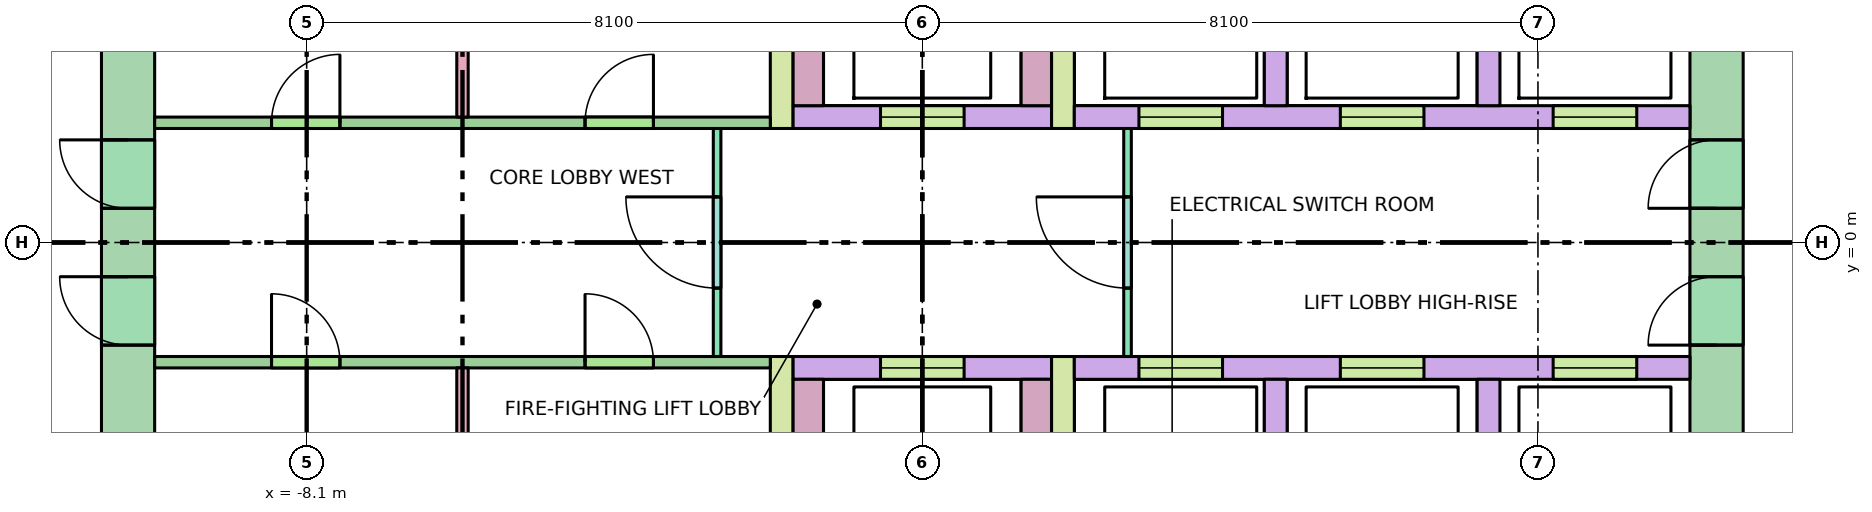
"""IFC4 building model, lengths in metres.
Left out: names, types, materials, properties, quantities, classifications, styles, units other than length and angle.
Written with IfcOpenShell. Run it as: python <this file> out.ifc"""

import sys

from ifc_helpers import new_model, si_unit, direction, frame, frame_2d, origin, place, context, subcontext, project, spatial, rectangle, extrude, element, fill, save


model = new_model("IFC4")
c1 = context("Model", 3, precision=1e-05, world=origin(), true_north=direction((0.0, 1.0)))
c2 = subcontext(c1, "Body", "Model", "MODEL_VIEW")
j1 = project(units=[si_unit("LENGTHUNIT", "METRE"), si_unit("PLANEANGLEUNIT", "RADIAN")], contexts=[c1])
p1 = place(None, origin())
s1 = spatial("IfcSite", under=j1, at=p1, CompositionType="ELEMENT")
p2 = place(p1, origin())
s2 = spatial("IfcBuilding", under=s1, at=p2, CompositionType="ELEMENT")
p3 = place(p2, frame((0.0, 0.0, 183.8)))
s3 = spatial("IfcBuildingStorey", under=s2, at=p3, CompositionType="ELEMENT", Elevation=183.8)
p4 = place(p3, frame((-10.45, -5.13, -0.28), z_axis=(0.0, 0.0, 1.0), x_axis=(0.0, 1.0, 0.0)))
e1 = element("IfcWall", 1, at=p4, inside=s3, PredefinedType="SHEAR", context=c2, shape_type="SweptSolid", body=[
    extrude(rectangle(XDim=10.26, YDim=0.7, at=frame_2d((5.13, 0.0))), origin(), (0.0, 0.0, 1.0), 9.0),
])
p5 = place(p4, frame((5.58, 0.0, 0.28)))
e2 = element("IfcOpeningElement", 2, at=p5, cuts=e1, PredefinedType="OPENING", context=c2, shape_type="SweptSolid", body=[
    extrude(rectangle(XDim=0.9, YDim=2.1, at=frame_2d((0.45, 1.05))), frame((0.0, 0.36, 0.0), z_axis=(0.0, -1.0, 0.0), x_axis=(1.0, 0.0, 0.0)), (0.0, 0.0, 1.0), 0.72),
])
p6 = place(p4, frame((3.78, 0.0, 0.28)))
e3 = element("IfcOpeningElement", 3, at=p6, cuts=e1, PredefinedType="OPENING", context=c2, shape_type="SweptSolid", body=[
    extrude(rectangle(XDim=0.9, YDim=2.1, at=frame_2d((0.45, 1.05))), frame((0.0, 0.36, 0.0), z_axis=(0.0, -1.0, 0.0), x_axis=(1.0, 0.0, 0.0)), (0.0, 0.0, 1.0), 0.72),
])
p7 = place(p3, frame((10.45, -5.13, -0.28), z_axis=(0.0, 0.0, 1.0), x_axis=(0.0, 1.0, 0.0)))
e4 = element("IfcWall", 4, at=p7, inside=s3, PredefinedType="SHEAR", context=c2, shape_type="SweptSolid", body=[
    extrude(rectangle(XDim=10.26, YDim=0.7, at=frame_2d((5.13, 0.0))), origin(), (0.0, 0.0, 1.0), 9.0),
])
p8 = place(p7, frame((5.58, 0.0, 0.28)))
e5 = element("IfcOpeningElement", 5, at=p8, cuts=e4, PredefinedType="OPENING", context=c2, shape_type="SweptSolid", body=[
    extrude(rectangle(XDim=0.9, YDim=2.1, at=frame_2d((0.45, 1.05))), frame((0.0, 0.36, 0.0), z_axis=(0.0, -1.0, 0.0), x_axis=(1.0, 0.0, 0.0)), (0.0, 0.0, 1.0), 0.72),
])
p9 = place(p7, frame((3.78, 0.0, 0.28)))
e6 = element("IfcOpeningElement", 6, at=p9, cuts=e4, PredefinedType="OPENING", context=c2, shape_type="SweptSolid", body=[
    extrude(rectangle(XDim=0.9, YDim=2.1, at=frame_2d((0.45, 1.05))), frame((0.0, 0.36, 0.0), z_axis=(0.0, -1.0, 0.0), x_axis=(1.0, 0.0, 0.0)), (0.0, 0.0, 1.0), 0.72),
])
p10 = place(p3, frame((2.0, 1.65, 0.0), z_axis=(0.0, 0.0, 1.0), x_axis=(1.0, 0.0, 0.0)))
e7 = element("IfcWall", 7, at=p10, inside=s3, PredefinedType="SOLIDWALL", context=c2, shape_type="SweptSolid", body=[
    extrude(rectangle(XDim=8.1, YDim=0.3, at=frame_2d((4.05, 0.0))), origin(), (0.0, 0.0, 1.0), 8.72),
])
p11 = place(p10, frame((0.85, 0.0, 0.0)))
e8 = element("IfcOpeningElement", 8, at=p11, cuts=e7, PredefinedType="OPENING", context=c2, shape_type="SweptSolid", body=[
    extrude(rectangle(XDim=1.1, YDim=2.1, at=frame_2d((0.55, 1.05))), frame((0.0, 0.16, 0.0), z_axis=(0.0, -1.0, 0.0), x_axis=(1.0, 0.0, 0.0)), (0.0, 0.0, 1.0), 0.32),
])
p12 = place(p10, frame((3.5, 0.0, 0.0)))
e9 = element("IfcOpeningElement", 9, at=p12, cuts=e7, PredefinedType="OPENING", context=c2, shape_type="SweptSolid", body=[
    extrude(rectangle(XDim=1.1, YDim=2.1, at=frame_2d((0.55, 1.05))), frame((0.0, 0.16, 0.0), z_axis=(0.0, -1.0, 0.0), x_axis=(1.0, 0.0, 0.0)), (0.0, 0.0, 1.0), 0.32),
])
p13 = place(p10, frame((6.3, 0.0, 0.0)))
e10 = element("IfcOpeningElement", 10, at=p13, cuts=e7, PredefinedType="OPENING", context=c2, shape_type="SweptSolid", body=[
    extrude(rectangle(XDim=1.1, YDim=2.1, at=frame_2d((0.55, 1.05))), frame((0.0, 0.16, 0.0), z_axis=(0.0, -1.0, 0.0), x_axis=(1.0, 0.0, 0.0)), (0.0, 0.0, 1.0), 0.32),
])
p14 = place(p3, frame((2.0, -1.65, 0.0), z_axis=(0.0, 0.0, 1.0), x_axis=(1.0, 0.0, 0.0)))
e11 = element("IfcWall", 11, at=p14, inside=s3, PredefinedType="SOLIDWALL", context=c2, shape_type="SweptSolid", body=[
    extrude(rectangle(XDim=8.1, YDim=0.3, at=frame_2d((4.05, 0.0))), origin(), (0.0, 0.0, 1.0), 8.72),
])
p15 = place(p14, frame((0.85, 0.0, 0.0)))
e12 = element("IfcOpeningElement", 12, at=p15, cuts=e11, PredefinedType="OPENING", context=c2, shape_type="SweptSolid", body=[
    extrude(rectangle(XDim=1.1, YDim=2.1, at=frame_2d((0.55, 1.05))), frame((0.0, 0.16, 0.0), z_axis=(0.0, -1.0, 0.0), x_axis=(1.0, 0.0, 0.0)), (0.0, 0.0, 1.0), 0.32),
])
p16 = place(p14, frame((3.5, 0.0, 0.0)))
e13 = element("IfcOpeningElement", 13, at=p16, cuts=e11, PredefinedType="OPENING", context=c2, shape_type="SweptSolid", body=[
    extrude(rectangle(XDim=1.1, YDim=2.1, at=frame_2d((0.55, 1.05))), frame((0.0, 0.16, 0.0), z_axis=(0.0, -1.0, 0.0), x_axis=(1.0, 0.0, 0.0)), (0.0, 0.0, 1.0), 0.32),
])
p17 = place(p14, frame((6.3, 0.0, 0.0)))
e14 = element("IfcOpeningElement", 14, at=p17, cuts=e11, PredefinedType="OPENING", context=c2, shape_type="SweptSolid", body=[
    extrude(rectangle(XDim=1.1, YDim=2.1, at=frame_2d((0.55, 1.05))), frame((0.0, 0.16, 0.0), z_axis=(0.0, -1.0, 0.0), x_axis=(1.0, 0.0, 0.0)), (0.0, 0.0, 1.0), 0.32),
])
for number, where, z_axis, x_axis in (
    (15, (4.65, 1.8, 0.0), (0.0, 0.0, 1.0), (0.0, 1.0, 0.0)),
    (16, (4.65, -4.2, 0.0), (0.0, 0.0, 1.0), (0.0, 1.0, 0.0)),
    (17, (7.45, 1.8, 0.0), (0.0, 0.0, 1.0), (0.0, 1.0, 0.0)),
    (18, (7.45, -4.2, 0.0), (0.0, 0.0, 1.0), (0.0, 1.0, 0.0)),
):
    element("IfcWall", number, at=place(p3, frame(where, z_axis=z_axis, x_axis=x_axis)), inside=s3, PredefinedType="SOLIDWALL", context=c2, shape_type="SweptSolid", body=[
        extrude(rectangle(XDim=2.4, YDim=0.3, at=frame_2d((1.2, 0.0))), origin(), (0.0, 0.0, 1.0), 8.72),
    ])
for number, where, z_axis, x_axis in (
    (19, (-1.85, 1.5, 0.0), (0.0, 0.0, 1.0), (0.0, 1.0, 0.0)),
    (20, (-1.85, -8.1, 0.0), (0.0, 0.0, 1.0), (0.0, 1.0, 0.0)),
    (21, (1.85, 1.5, 0.0), (0.0, 0.0, 1.0), (0.0, 1.0, 0.0)),
    (22, (1.85, -8.1, 0.0), (0.0, 0.0, 1.0), (0.0, 1.0, 0.0)),
):
    element("IfcWall", number, at=place(p3, frame(where, z_axis=z_axis, x_axis=x_axis)), inside=s3, PredefinedType="SHEAR", context=c2, shape_type="SweptSolid", body=[
        extrude(rectangle(XDim=6.6, YDim=0.3, at=frame_2d((3.3, 0.0))), origin(), (0.0, 0.0, 1.0), 8.72),
    ])
p18 = place(p3, frame((-1.7, 1.65, 0.0), z_axis=(0.0, 0.0, 1.0), x_axis=(1.0, 0.0, 0.0)))
e23 = element("IfcWall", 23, at=p18, inside=s3, PredefinedType="SOLIDWALL", context=c2, shape_type="SweptSolid", body=[
    extrude(rectangle(XDim=3.4, YDim=0.3, at=frame_2d((1.7, 0.0))), origin(), (0.0, 0.0, 1.0), 8.72),
])
p19 = place(p18, frame((1.15, 0.0, 0.0)))
e24 = element("IfcOpeningElement", 24, at=p19, cuts=e23, PredefinedType="OPENING", context=c2, shape_type="SweptSolid", body=[
    extrude(rectangle(XDim=1.1, YDim=2.1, at=frame_2d((0.55, 1.05))), frame((0.0, 0.16, 0.0), z_axis=(0.0, -1.0, 0.0), x_axis=(1.0, 0.0, 0.0)), (0.0, 0.0, 1.0), 0.32),
])
p20 = place(p3, frame((-1.7, -1.65, 0.0), z_axis=(0.0, 0.0, 1.0), x_axis=(1.0, 0.0, 0.0)))
e25 = element("IfcWall", 25, at=p20, inside=s3, PredefinedType="SOLIDWALL", context=c2, shape_type="SweptSolid", body=[
    extrude(rectangle(XDim=3.4, YDim=0.3, at=frame_2d((1.7, 0.0))), origin(), (0.0, 0.0, 1.0), 8.72),
])
p21 = place(p20, frame((1.15, 0.0, 0.0)))
e26 = element("IfcOpeningElement", 26, at=p21, cuts=e25, PredefinedType="OPENING", context=c2, shape_type="SweptSolid", body=[
    extrude(rectangle(XDim=1.1, YDim=2.1, at=frame_2d((0.55, 1.05))), frame((0.0, 0.16, 0.0), z_axis=(0.0, -1.0, 0.0), x_axis=(1.0, 0.0, 0.0)), (0.0, 0.0, 1.0), 0.32),
])
for number, where, z_axis, x_axis in (
    (27, (-1.5, 1.8, 0.0), (0.0, 0.0, 1.0), (0.0, 1.0, 0.0)),
    (28, (-1.5, -4.8, 0.0), (0.0, 0.0, 1.0), (0.0, 1.0, 0.0)),
    (29, (1.5, 1.8, 0.0), (0.0, 0.0, 1.0), (0.0, 1.0, 0.0)),
    (30, (1.5, -4.8, 0.0), (0.0, 0.0, 1.0), (0.0, 1.0, 0.0)),
):
    element("IfcWall", number, at=place(p3, frame(where, z_axis=z_axis, x_axis=x_axis)), inside=s3, PredefinedType="SOLIDWALL", context=c2, shape_type="SweptSolid", body=[
        extrude(rectangle(XDim=3.0, YDim=0.4, at=frame_2d((1.5, 0.0))), origin(), (0.0, 0.0, 1.0), 8.72),
    ])
p22 = place(p3, frame((-2.7, -1.5, 0.0), z_axis=(0.0, 0.0, 1.0), x_axis=(0.0, 1.0, 0.0)))
e31 = element("IfcWall", 31, at=p22, inside=s3, PredefinedType="PARTITIONING", context=c2, shape_type="SweptSolid", body=[
    extrude(rectangle(XDim=3.0, YDim=0.1, at=frame_2d((1.5, 0.0))), origin(), (0.0, 0.0, 1.0), 8.72),
])
p23 = place(p22, frame((0.9, 0.0, 0.0)))
e32 = element("IfcOpeningElement", 32, at=p23, cuts=e31, PredefinedType="OPENING", context=c2, shape_type="SweptSolid", body=[
    extrude(rectangle(XDim=1.2, YDim=2.1, at=frame_2d((0.6, 1.05))), frame((0.0, 0.06, 0.0), z_axis=(0.0, -1.0, 0.0), x_axis=(1.0, 0.0, 0.0)), (0.0, 0.0, 1.0), 0.12),
])
p24 = place(p3, frame((2.7, -1.5, 0.0), z_axis=(0.0, 0.0, 1.0), x_axis=(0.0, 1.0, 0.0)))
e33 = element("IfcWall", 33, at=p24, inside=s3, PredefinedType="PARTITIONING", context=c2, shape_type="SweptSolid", body=[
    extrude(rectangle(XDim=3.0, YDim=0.1, at=frame_2d((1.5, 0.0))), origin(), (0.0, 0.0, 1.0), 8.72),
])
p25 = place(p24, frame((0.9, 0.0, 0.0)))
e34 = element("IfcOpeningElement", 34, at=p25, cuts=e33, PredefinedType="OPENING", context=c2, shape_type="SweptSolid", body=[
    extrude(rectangle(XDim=1.2, YDim=2.1, at=frame_2d((0.6, 1.05))), frame((0.0, 0.06, 0.0), z_axis=(0.0, -1.0, 0.0), x_axis=(1.0, 0.0, 0.0)), (0.0, 0.0, 1.0), 0.12),
])
for number, where, z_axis, x_axis in (
    (35, (-6.05, 1.65, 0.0), (0.0, 0.0, 1.0), (0.0, 1.0, 0.0)),
    (36, (-6.05, -4.2, 0.0), (0.0, 0.0, 1.0), (0.0, 1.0, 0.0)),
):
    element("IfcWall", number, at=place(p3, frame(where, z_axis=z_axis, x_axis=x_axis)), inside=s3, PredefinedType="PARTITIONING", context=c2, shape_type="SweptSolid", body=[
        extrude(rectangle(XDim=2.55, YDim=0.15, at=frame_2d((1.275, 0.0))), origin(), (0.0, 0.0, 1.0), 8.72),
    ])
p26 = place(p3, frame((-10.1, 1.575, 0.0), z_axis=(0.0, 0.0, 1.0), x_axis=(1.0, 0.0, 0.0)))
e37 = element("IfcWall", 37, at=p26, inside=s3, PredefinedType="PARTITIONING", context=c2, shape_type="SweptSolid", body=[
    extrude(rectangle(XDim=8.1, YDim=0.15, at=frame_2d((4.05, 0.0))), origin(), (0.0, 0.0, 1.0), 8.72),
])
p27 = place(p26, frame((1.538, 0.0, 0.0)))
e38 = element("IfcOpeningElement", 38, at=p27, cuts=e37, PredefinedType="OPENING", context=c2, shape_type="SweptSolid", body=[
    extrude(rectangle(XDim=0.9, YDim=2.1, at=frame_2d((0.45, 1.05))), frame((0.0, 0.085, 0.0), z_axis=(0.0, -1.0, 0.0), x_axis=(1.0, 0.0, 0.0)), (0.0, 0.0, 1.0), 0.17),
])
p28 = place(p26, frame((5.663, 0.0, 0.0)))
e39 = element("IfcOpeningElement", 39, at=p28, cuts=e37, PredefinedType="OPENING", context=c2, shape_type="SweptSolid", body=[
    extrude(rectangle(XDim=0.9, YDim=2.1, at=frame_2d((0.45, 1.05))), frame((0.0, 0.085, 0.0), z_axis=(0.0, -1.0, 0.0), x_axis=(1.0, 0.0, 0.0)), (0.0, 0.0, 1.0), 0.17),
])
p29 = place(p3, frame((-10.1, -1.575, 0.0), z_axis=(0.0, 0.0, 1.0), x_axis=(1.0, 0.0, 0.0)))
e40 = element("IfcWall", 40, at=p29, inside=s3, PredefinedType="PARTITIONING", context=c2, shape_type="SweptSolid", body=[
    extrude(rectangle(XDim=8.1, YDim=0.15, at=frame_2d((4.05, 0.0))), origin(), (0.0, 0.0, 1.0), 8.72),
])
p30 = place(p29, frame((1.538, 0.0, 0.0)))
e41 = element("IfcOpeningElement", 41, at=p30, cuts=e40, PredefinedType="OPENING", context=c2, shape_type="SweptSolid", body=[
    extrude(rectangle(XDim=0.9, YDim=2.1, at=frame_2d((0.45, 1.05))), frame((0.0, 0.085, 0.0), z_axis=(0.0, -1.0, 0.0), x_axis=(1.0, 0.0, 0.0)), (0.0, 0.0, 1.0), 0.17),
])
p31 = place(p29, frame((5.663, 0.0, 0.0)))
e42 = element("IfcOpeningElement", 42, at=p31, cuts=e40, PredefinedType="OPENING", context=c2, shape_type="SweptSolid", body=[
    extrude(rectangle(XDim=0.9, YDim=2.1, at=frame_2d((0.45, 1.05))), frame((0.0, 0.085, 0.0), z_axis=(0.0, -1.0, 0.0), x_axis=(1.0, 0.0, 0.0)), (0.0, 0.0, 1.0), 0.17),
])
p32 = place(p11, origin())
e43 = element("IfcDoor", 43, at=p32, inside=s3, OperationType="DOUBLE_DOOR_SLIDING", PredefinedType="DOOR", context=c2, shape_type="SweptSolid", body=[
    extrude(rectangle(XDim=1.1, YDim=2.1, at=frame_2d((0.55, 1.05))), frame((0.0, 0.025, 0.0), z_axis=(0.0, -1.0, 0.0), x_axis=(1.0, 0.0, 0.0)), (0.0, 0.0, 1.0), 0.05),
])
fill(e8, e43)
p33 = place(p12, origin())
e44 = element("IfcDoor", 44, at=p33, inside=s3, OperationType="DOUBLE_DOOR_SLIDING", PredefinedType="DOOR", context=c2, shape_type="SweptSolid", body=[
    extrude(rectangle(XDim=1.1, YDim=2.1, at=frame_2d((0.55, 1.05))), frame((0.0, 0.025, 0.0), z_axis=(0.0, -1.0, 0.0), x_axis=(1.0, 0.0, 0.0)), (0.0, 0.0, 1.0), 0.05),
])
fill(e9, e44)
p34 = place(p13, origin())
e45 = element("IfcDoor", 45, at=p34, inside=s3, OperationType="DOUBLE_DOOR_SLIDING", PredefinedType="DOOR", context=c2, shape_type="SweptSolid", body=[
    extrude(rectangle(XDim=1.1, YDim=2.1, at=frame_2d((0.55, 1.05))), frame((0.0, 0.025, 0.0), z_axis=(0.0, -1.0, 0.0), x_axis=(1.0, 0.0, 0.0)), (0.0, 0.0, 1.0), 0.05),
])
fill(e10, e45)
p35 = place(p15, origin())
e46 = element("IfcDoor", 46, at=p35, inside=s3, OperationType="DOUBLE_DOOR_SLIDING", PredefinedType="DOOR", context=c2, shape_type="SweptSolid", body=[
    extrude(rectangle(XDim=1.1, YDim=2.1, at=frame_2d((0.55, 1.05))), frame((0.0, 0.025, 0.0), z_axis=(0.0, -1.0, 0.0), x_axis=(1.0, 0.0, 0.0)), (0.0, 0.0, 1.0), 0.05),
])
fill(e12, e46)
p36 = place(p16, origin())
e47 = element("IfcDoor", 47, at=p36, inside=s3, OperationType="DOUBLE_DOOR_SLIDING", PredefinedType="DOOR", context=c2, shape_type="SweptSolid", body=[
    extrude(rectangle(XDim=1.1, YDim=2.1, at=frame_2d((0.55, 1.05))), frame((0.0, 0.025, 0.0), z_axis=(0.0, -1.0, 0.0), x_axis=(1.0, 0.0, 0.0)), (0.0, 0.0, 1.0), 0.05),
])
fill(e13, e47)
p37 = place(p17, origin())
e48 = element("IfcDoor", 48, at=p37, inside=s3, OperationType="DOUBLE_DOOR_SLIDING", PredefinedType="DOOR", context=c2, shape_type="SweptSolid", body=[
    extrude(rectangle(XDim=1.1, YDim=2.1, at=frame_2d((0.55, 1.05))), frame((0.0, 0.025, 0.0), z_axis=(0.0, -1.0, 0.0), x_axis=(1.0, 0.0, 0.0)), (0.0, 0.0, 1.0), 0.05),
])
fill(e14, e48)
p38 = place(p19, origin())
e49 = element("IfcDoor", 49, at=p38, inside=s3, OperationType="DOUBLE_DOOR_SLIDING", PredefinedType="DOOR", context=c2, shape_type="SweptSolid", body=[
    extrude(rectangle(XDim=1.1, YDim=2.1, at=frame_2d((0.55, 1.05))), frame((0.0, 0.025, 0.0), z_axis=(0.0, -1.0, 0.0), x_axis=(1.0, 0.0, 0.0)), (0.0, 0.0, 1.0), 0.05),
])
fill(e24, e49)
p39 = place(p21, origin())
e50 = element("IfcDoor", 50, at=p39, inside=s3, OperationType="DOUBLE_DOOR_SLIDING", PredefinedType="DOOR", context=c2, shape_type="SweptSolid", body=[
    extrude(rectangle(XDim=1.1, YDim=2.1, at=frame_2d((0.55, 1.05))), frame((0.0, 0.025, 0.0), z_axis=(0.0, -1.0, 0.0), x_axis=(1.0, 0.0, 0.0)), (0.0, 0.0, 1.0), 0.05),
])
fill(e26, e50)
p40 = place(p5, origin())
e51 = element("IfcDoor", 51, at=p40, inside=s3, OperationType="SINGLE_SWING_RIGHT", PredefinedType="DOOR", context=c2, shape_type="SweptSolid", body=[
    extrude(rectangle(XDim=0.9, YDim=2.1, at=frame_2d((0.45, 1.05))), frame((0.0, 0.025, 0.0), z_axis=(0.0, -1.0, 0.0), x_axis=(1.0, 0.0, 0.0)), (0.0, 0.0, 1.0), 0.05),
])
fill(e2, e51)
p41 = place(p6, origin())
e52 = element("IfcDoor", 52, at=p41, inside=s3, OperationType="SINGLE_SWING_RIGHT", PredefinedType="DOOR", context=c2, shape_type="SweptSolid", body=[
    extrude(rectangle(XDim=0.9, YDim=2.1, at=frame_2d((0.45, 1.05))), frame((0.0, 0.025, 0.0), z_axis=(0.0, -1.0, 0.0), x_axis=(1.0, 0.0, 0.0)), (0.0, 0.0, 1.0), 0.05),
])
fill(e3, e52)
p42 = place(p8, origin())
e53 = element("IfcDoor", 53, at=p42, inside=s3, OperationType="SINGLE_SWING_LEFT", PredefinedType="DOOR", context=c2, shape_type="SweptSolid", body=[
    extrude(rectangle(XDim=0.9, YDim=2.1, at=frame_2d((0.45, 1.05))), frame((0.0, 0.025, 0.0), z_axis=(0.0, -1.0, 0.0), x_axis=(1.0, 0.0, 0.0)), (0.0, 0.0, 1.0), 0.05),
])
fill(e5, e53)
p43 = place(p9, origin())
e54 = element("IfcDoor", 54, at=p43, inside=s3, OperationType="SINGLE_SWING_LEFT", PredefinedType="DOOR", context=c2, shape_type="SweptSolid", body=[
    extrude(rectangle(XDim=0.9, YDim=2.1, at=frame_2d((0.45, 1.05))), frame((0.0, 0.025, 0.0), z_axis=(0.0, -1.0, 0.0), x_axis=(1.0, 0.0, 0.0)), (0.0, 0.0, 1.0), 0.05),
])
fill(e6, e54)
p44 = place(p23, origin())
e55 = element("IfcDoor", 55, at=p44, inside=s3, OperationType="SINGLE_SWING_RIGHT", PredefinedType="DOOR", context=c2, shape_type="SweptSolid", body=[
    extrude(rectangle(XDim=1.2, YDim=2.1, at=frame_2d((0.6, 1.05))), frame((0.0, 0.025, 0.0), z_axis=(0.0, -1.0, 0.0), x_axis=(1.0, 0.0, 0.0)), (0.0, 0.0, 1.0), 0.05),
])
fill(e32, e55)
p45 = place(p25, origin())
e56 = element("IfcDoor", 56, at=p45, inside=s3, OperationType="SINGLE_SWING_RIGHT", PredefinedType="DOOR", context=c2, shape_type="SweptSolid", body=[
    extrude(rectangle(XDim=1.2, YDim=2.1, at=frame_2d((0.6, 1.05))), frame((0.0, 0.025, 0.0), z_axis=(0.0, -1.0, 0.0), x_axis=(1.0, 0.0, 0.0)), (0.0, 0.0, 1.0), 0.05),
])
fill(e34, e56)
p46 = place(p27, origin())
e57 = element("IfcDoor", 57, at=p46, inside=s3, OperationType="SINGLE_SWING_RIGHT", PredefinedType="DOOR", context=c2, shape_type="SweptSolid", body=[
    extrude(rectangle(XDim=0.9, YDim=2.1, at=frame_2d((0.45, 1.05))), frame((0.0, 0.025, 0.0), z_axis=(0.0, -1.0, 0.0), x_axis=(1.0, 0.0, 0.0)), (0.0, 0.0, 1.0), 0.05),
])
fill(e38, e57)
p47 = place(p28, origin())
e58 = element("IfcDoor", 58, at=p47, inside=s3, OperationType="SINGLE_SWING_RIGHT", PredefinedType="DOOR", context=c2, shape_type="SweptSolid", body=[
    extrude(rectangle(XDim=0.9, YDim=2.1, at=frame_2d((0.45, 1.05))), frame((0.0, 0.025, 0.0), z_axis=(0.0, -1.0, 0.0), x_axis=(1.0, 0.0, 0.0)), (0.0, 0.0, 1.0), 0.05),
])
fill(e39, e58)
p48 = place(p30, origin())
e59 = element("IfcDoor", 59, at=p48, inside=s3, OperationType="SINGLE_SWING_LEFT", PredefinedType="DOOR", context=c2, shape_type="SweptSolid", body=[
    extrude(rectangle(XDim=0.9, YDim=2.1, at=frame_2d((0.45, 1.05))), frame((0.0, 0.025, 0.0), z_axis=(0.0, -1.0, 0.0), x_axis=(1.0, 0.0, 0.0)), (0.0, 0.0, 1.0), 0.05),
])
fill(e41, e59)
p49 = place(p31, origin())
e60 = element("IfcDoor", 60, at=p49, inside=s3, OperationType="SINGLE_SWING_LEFT", PredefinedType="DOOR", context=c2, shape_type="SweptSolid", body=[
    extrude(rectangle(XDim=0.9, YDim=2.1, at=frame_2d((0.45, 1.05))), frame((0.0, 0.025, 0.0), z_axis=(0.0, -1.0, 0.0), x_axis=(1.0, 0.0, 0.0)), (0.0, 0.0, 1.0), 0.05),
])
fill(e42, e60)
save(model, sys.argv[1])
